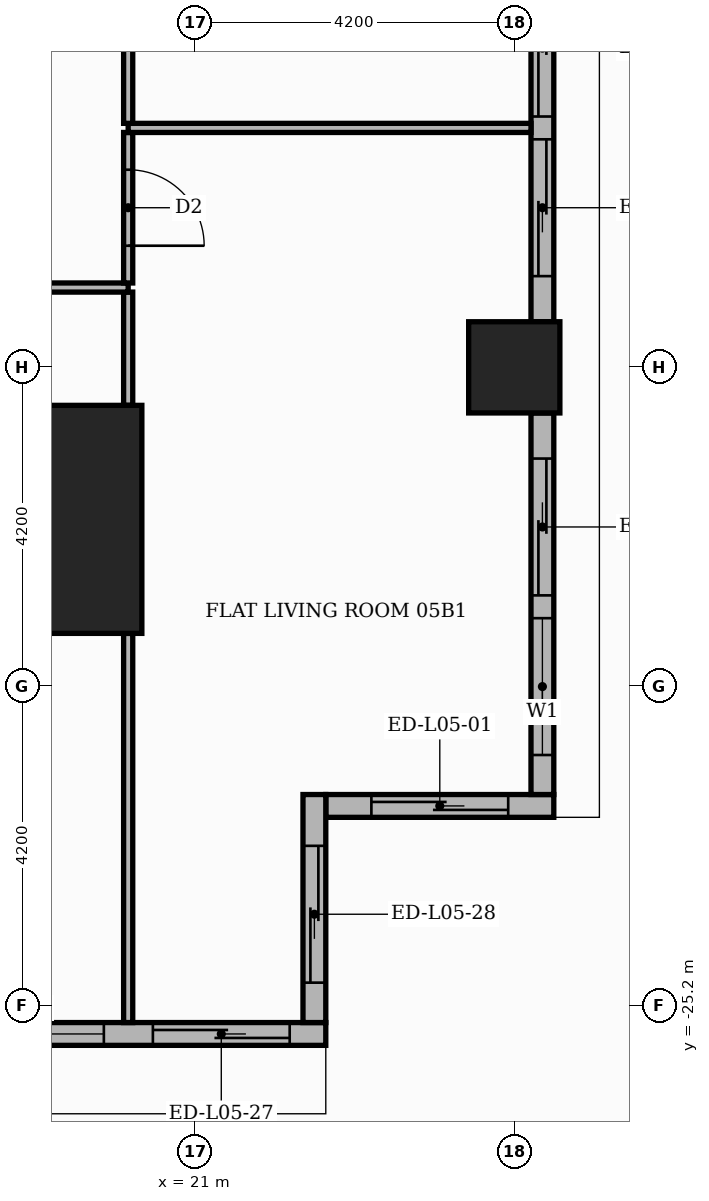
"""IFC4 building model, lengths in metres.
Left out: names, types, materials, properties, quantities, classifications, styles, units other than length and angle.
Written with IfcOpenShell. Run it as: python <this file> out.ifc"""

import sys

from ifc_helpers import new_model, si_unit, direction, frame, frame_2d, origin, origin_2d, place, context, subcontext, project, spatial, rectangle, extrude, element, fill, save


model = new_model("IFC4")
c1 = context("Model", 3, precision=1e-05, world=origin(), true_north=direction((0.0, 1.0)))
c2 = subcontext(c1, "Body", "Model", "MODEL_VIEW")
j1 = project(units=[si_unit("LENGTHUNIT", "METRE"), si_unit("PLANEANGLEUNIT", "RADIAN")], contexts=[c1])
p1 = place(None, origin())
s1 = spatial("IfcSite", under=j1, at=p1, CompositionType="ELEMENT")
p2 = place(p1, origin())
s2 = spatial("IfcBuilding", under=s1, at=p2, CompositionType="ELEMENT")
p3 = place(p2, frame((0.0, 0.0, 27.0)))
s3 = spatial("IfcBuildingStorey", under=s2, at=p3, CompositionType="ELEMENT", Elevation=27.0)
p4 = place(p3, frame((18.8, -18.8, 0.0), z_axis=(0.0, 0.0, 1.0), x_axis=(1.0, 0.0, 0.0)))
e1 = element("IfcColumn", 1, at=p4, inside=s3, PredefinedType="COLUMN", context=c2, shape_type="SweptSolid", body=[
    extrude(rectangle(XDim=3.0, YDim=3.0, at=origin_2d()), origin(), (0.0, 0.0, 1.0), 3.9),
])
p5 = place(p3, frame((25.2, -16.8, 0.0), z_axis=(0.0, 0.0, 1.0), x_axis=(1.0, 0.0, 0.0)))
e2 = element("IfcColumn", 2, at=p5, inside=s3, PredefinedType="COLUMN", context=c2, shape_type="SweptSolid", body=[
    extrude(rectangle(XDim=1.2, YDim=1.2, at=origin_2d()), origin(), (0.0, 0.0, 1.0), 3.9),
])
p6 = place(p3, frame((22.72, -22.57, 0.0), z_axis=(0.0, 0.0, 1.0), x_axis=(1.0, 0.0, 0.0)))
e3 = element("IfcWall", 3, at=p6, inside=s3, PredefinedType="STANDARD", context=c2, shape_type="SweptSolid", body=[
    extrude(rectangle(XDim=3.0, YDim=0.3, at=frame_2d((1.5, 0.0))), origin(), (0.0, 0.0, 1.0), 3.48),
])
p7 = place(p6, frame((0.6, 0.0, 0.0)))
e4 = element("IfcOpeningElement", 4, at=p7, cuts=e3, PredefinedType="OPENING", context=c2, shape_type="SweptSolid", body=[
    extrude(rectangle(XDim=1.8, YDim=2.4, at=frame_2d((0.9, 1.2))), frame((0.0, 0.16, 0.0), z_axis=(0.0, -1.0, 0.0), x_axis=(1.0, 0.0, 0.0)), (0.0, 0.0, 1.0), 0.32),
])
p8 = place(p3, frame((25.57, -22.42, 0.0), z_axis=(0.0, 0.0, 1.0), x_axis=(0.0, 1.0, 0.0)))
e5 = element("IfcWall", 5, at=p8, inside=s3, PredefinedType="STANDARD", context=c2, shape_type="SweptSolid", body=[
    extrude(rectangle(XDim=5.02, YDim=0.3, at=frame_2d((2.51, 0.0))), origin(), (0.0, 0.0, 1.0), 3.48),
])
p9 = place(p8, frame((0.52, 0.0, 0.9)))
e6 = element("IfcOpeningElement", 6, at=p9, cuts=e5, PredefinedType="OPENING", context=c2, shape_type="SweptSolid", body=[
    extrude(rectangle(XDim=1.8, YDim=2.1, at=frame_2d((0.9, 1.05))), frame((0.0, 0.16, 0.0), z_axis=(0.0, -1.0, 0.0), x_axis=(1.0, 0.0, 0.0)), (0.0, 0.0, 1.0), 0.32),
])
p10 = place(p8, frame((2.62, 0.0, 0.0)))
e7 = element("IfcOpeningElement", 7, at=p10, cuts=e5, PredefinedType="OPENING", context=c2, shape_type="SweptSolid", body=[
    extrude(rectangle(XDim=1.8, YDim=2.4, at=frame_2d((0.9, 1.2))), frame((0.0, 0.16, 0.0), z_axis=(0.0, -1.0, 0.0), x_axis=(1.0, 0.0, 0.0)), (0.0, 0.0, 1.0), 0.32),
])
p11 = place(p3, frame((25.57, -16.2, 0.0), z_axis=(0.0, 0.0, 1.0), x_axis=(0.0, 1.0, 0.0)))
e8 = element("IfcWall", 8, at=p11, inside=s3, PredefinedType="STANDARD", context=c2, shape_type="SweptSolid", body=[
    extrude(rectangle(XDim=7.2, YDim=0.3, at=frame_2d((3.6, 0.0))), origin(), (0.0, 0.0, 1.0), 3.48),
])
p12 = place(p11, frame((0.6, 0.0, 0.0)))
e9 = element("IfcOpeningElement", 9, at=p12, cuts=e8, PredefinedType="OPENING", context=c2, shape_type="SweptSolid", body=[
    extrude(rectangle(XDim=1.8, YDim=2.4, at=frame_2d((0.9, 1.2))), frame((0.0, 0.16, 0.0), z_axis=(0.0, -1.0, 0.0), x_axis=(1.0, 0.0, 0.0)), (0.0, 0.0, 1.0), 0.32),
])
p13 = place(p11, frame((2.7, 0.0, 0.0)))
e10 = element("IfcOpeningElement", 10, at=p13, cuts=e8, PredefinedType="OPENING", context=c2, shape_type="SweptSolid", body=[
    extrude(rectangle(XDim=1.8, YDim=2.4, at=frame_2d((0.9, 1.2))), frame((0.0, 0.16, 0.0), z_axis=(0.0, -1.0, 0.0), x_axis=(1.0, 0.0, 0.0)), (0.0, 0.0, 1.0), 0.32),
])
p14 = place(p11, frame((4.8, 0.0, 0.9)))
e11 = element("IfcOpeningElement", 11, at=p14, cuts=e8, PredefinedType="OPENING", context=c2, shape_type="SweptSolid", body=[
    extrude(rectangle(XDim=1.8, YDim=2.1, at=frame_2d((0.9, 1.05))), frame((0.0, 0.16, 0.0), z_axis=(0.0, -1.0, 0.0), x_axis=(1.0, 0.0, 0.0)), (0.0, 0.0, 1.0), 0.32),
])
p15 = place(p3, frame((17.4, -25.57, 0.0), z_axis=(0.0, 0.0, 1.0), x_axis=(1.0, 0.0, 0.0)))
e12 = element("IfcWall", 12, at=p15, inside=s3, PredefinedType="STANDARD", context=c2, shape_type="SweptSolid", body=[
    extrude(rectangle(XDim=5.32, YDim=0.3, at=frame_2d((2.66, 0.0))), origin(), (0.0, 0.0, 1.0), 3.48),
])
p16 = place(p15, frame((0.6, 0.0, 0.9)))
e13 = element("IfcOpeningElement", 13, at=p16, cuts=e12, PredefinedType="OPENING", context=c2, shape_type="SweptSolid", body=[
    extrude(rectangle(XDim=1.8, YDim=2.1, at=frame_2d((0.9, 1.05))), frame((0.0, 0.16, 0.0), z_axis=(0.0, -1.0, 0.0), x_axis=(1.0, 0.0, 0.0)), (0.0, 0.0, 1.0), 0.32),
])
p17 = place(p15, frame((3.045, 0.0, 0.0)))
e14 = element("IfcOpeningElement", 14, at=p17, cuts=e12, PredefinedType="OPENING", context=c2, shape_type="SweptSolid", body=[
    extrude(rectangle(XDim=1.8, YDim=2.4, at=frame_2d((0.9, 1.2))), frame((0.0, 0.16, 0.0), z_axis=(0.0, -1.0, 0.0), x_axis=(1.0, 0.0, 0.0)), (0.0, 0.0, 1.0), 0.32),
])
p18 = place(p3, frame((22.57, -25.42, 0.0), z_axis=(0.0, 0.0, 1.0), x_axis=(0.0, 1.0, 0.0)))
e15 = element("IfcWall", 15, at=p18, inside=s3, PredefinedType="STANDARD", context=c2, shape_type="SweptSolid", body=[
    extrude(rectangle(XDim=3.0, YDim=0.3, at=frame_2d((1.5, 0.0))), origin(), (0.0, 0.0, 1.0), 3.48),
])
p19 = place(p18, frame((0.525, 0.0, 0.0)))
e16 = element("IfcOpeningElement", 16, at=p19, cuts=e15, PredefinedType="OPENING", context=c2, shape_type="SweptSolid", body=[
    extrude(rectangle(XDim=1.8, YDim=2.4, at=frame_2d((0.9, 1.2))), frame((0.0, 0.16, 0.0), z_axis=(0.0, -1.0, 0.0), x_axis=(1.0, 0.0, 0.0)), (0.0, 0.0, 1.0), 0.32),
])
p20 = place(p3, frame((20.12, -25.42, 0.0), z_axis=(0.0, 0.0, 1.0), x_axis=(0.0, 1.0, 0.0)))
e17 = element("IfcWall", 17, at=p20, inside=s3, PredefinedType="PARTITIONING", context=c2, shape_type="SweptSolid", body=[
    extrude(rectangle(XDim=5.12, YDim=0.12, at=frame_2d((2.56, 0.0))), origin(), (0.0, 0.0, 1.0), 3.48),
])
p21 = place(p3, frame((20.12, -17.3, 0.0), z_axis=(0.0, 0.0, 1.0), x_axis=(0.0, 1.0, 0.0)))
e18 = element("IfcWall", 18, at=p21, inside=s3, PredefinedType="PARTITIONING", context=c2, shape_type="SweptSolid", body=[
    extrude(rectangle(XDim=1.49, YDim=0.12, at=frame_2d((0.745, 0.0))), origin(), (0.0, 0.0, 1.0), 3.48),
])
p22 = place(p3, frame((13.75, -15.75, 0.0), z_axis=(0.0, 0.0, 1.0), x_axis=(1.0, 0.0, 0.0)))
e19 = element("IfcWall", 19, at=p22, inside=s3, PredefinedType="PARTITIONING", context=c2, shape_type="SweptSolid", body=[
    extrude(rectangle(XDim=6.37, YDim=0.12, at=frame_2d((3.185, 0.0))), origin(), (0.0, 0.0, 1.0), 3.48),
])
p23 = place(p22, frame((2.635, 0.0, 0.0)))
e20 = element("IfcOpeningElement", 20, at=p23, cuts=e19, PredefinedType="OPENING", context=c2, shape_type="SweptSolid", body=[
    extrude(rectangle(XDim=1.0, YDim=2.1, at=frame_2d((0.5, 1.05))), frame((0.0, 0.07, 0.0), z_axis=(0.0, -1.0, 0.0), x_axis=(1.0, 0.0, 0.0)), (0.0, 0.0, 1.0), 0.14),
])
p24 = place(p3, frame((20.12, -15.69, 0.0), z_axis=(0.0, 0.0, 1.0), x_axis=(0.0, 1.0, 0.0)))
e21 = element("IfcWall", 21, at=p24, inside=s3, PredefinedType="PARTITIONING", context=c2, shape_type="SweptSolid", body=[
    extrude(rectangle(XDim=1.98, YDim=0.12, at=frame_2d((0.99, 0.0))), origin(), (0.0, 0.0, 1.0), 3.48),
])
p25 = place(p24, frame((0.49, 0.0, 0.0)))
e22 = element("IfcOpeningElement", 22, at=p25, cuts=e21, PredefinedType="OPENING", context=c2, shape_type="SweptSolid", body=[
    extrude(rectangle(XDim=1.0, YDim=2.1, at=frame_2d((0.5, 1.05))), frame((0.0, 0.07, 0.0), z_axis=(0.0, -1.0, 0.0), x_axis=(1.0, 0.0, 0.0)), (0.0, 0.0, 1.0), 0.14),
])
p26 = place(p3, frame((20.12, -13.65, 0.0), z_axis=(0.0, 0.0, 1.0), x_axis=(1.0, 0.0, 0.0)))
e23 = element("IfcWall", 23, at=p26, inside=s3, PredefinedType="PARTITIONING", context=c2, shape_type="SweptSolid", body=[
    extrude(rectangle(XDim=5.3, YDim=0.12, at=frame_2d((2.65, 0.0))), origin(), (0.0, 0.0, 1.0), 3.48),
])
p27 = place(p3, frame((20.12, -13.59, 0.0), z_axis=(0.0, 0.0, 1.0), x_axis=(0.0, 1.0, 0.0)))
e24 = element("IfcWall", 24, at=p27, inside=s3, PredefinedType="PARTITIONING", context=c2, shape_type="SweptSolid", body=[
    extrude(rectangle(XDim=4.08, YDim=0.12, at=frame_2d((2.04, 0.0))), origin(), (0.0, 0.0, 1.0), 3.48),
])
p28 = place(p27, frame((1.59, 0.0, 0.0)))
e25 = element("IfcOpeningElement", 25, at=p28, cuts=e24, PredefinedType="OPENING", context=c2, shape_type="SweptSolid", body=[
    extrude(rectangle(XDim=0.9, YDim=2.1, at=frame_2d((0.45, 1.05))), frame((0.0, 0.07, 0.0), z_axis=(0.0, -1.0, 0.0), x_axis=(1.0, 0.0, 0.0)), (0.0, 0.0, 1.0), 0.14),
])
p29 = place(p7, origin())
e26 = element("IfcDoor", 26, at=p29, inside=s3, OperationType="SLIDING_TO_RIGHT", PredefinedType="DOOR", context=c2, shape_type="SweptSolid", body=[
    extrude(rectangle(XDim=1.8, YDim=2.4, at=frame_2d((0.9, 1.2))), frame((0.0, 0.025, 0.0), z_axis=(0.0, -1.0, 0.0), x_axis=(1.0, 0.0, 0.0)), (0.0, 0.0, 1.0), 0.05),
])
fill(e4, e26)
p30 = place(p9, origin())
e27 = element("IfcWindow", 27, at=p30, inside=s3, PartitioningType="SINGLE_PANEL", PredefinedType="WINDOW", context=c2, shape_type="SweptSolid", body=[
    extrude(rectangle(XDim=1.8, YDim=2.1, at=frame_2d((0.9, 1.05))), frame((0.0, 0.03, 0.0), z_axis=(0.0, -1.0, 0.0), x_axis=(1.0, 0.0, 0.0)), (0.0, 0.0, 1.0), 0.06),
])
fill(e6, e27)
p31 = place(p10, origin())
e28 = element("IfcDoor", 28, at=p31, inside=s3, OperationType="SLIDING_TO_RIGHT", PredefinedType="DOOR", context=c2, shape_type="SweptSolid", body=[
    extrude(rectangle(XDim=1.8, YDim=2.4, at=frame_2d((0.9, 1.2))), frame((0.0, 0.025, 0.0), z_axis=(0.0, -1.0, 0.0), x_axis=(1.0, 0.0, 0.0)), (0.0, 0.0, 1.0), 0.05),
])
fill(e7, e28)
p32 = place(p12, origin())
e29 = element("IfcDoor", 29, at=p32, inside=s3, OperationType="SLIDING_TO_LEFT", PredefinedType="DOOR", context=c2, shape_type="SweptSolid", body=[
    extrude(rectangle(XDim=1.8, YDim=2.4, at=frame_2d((0.9, 1.2))), frame((0.0, 0.025, 0.0), z_axis=(0.0, -1.0, 0.0), x_axis=(1.0, 0.0, 0.0)), (0.0, 0.0, 1.0), 0.05),
])
fill(e9, e29)
p33 = place(p13, origin())
e30 = element("IfcDoor", 30, at=p33, inside=s3, OperationType="SLIDING_TO_RIGHT", PredefinedType="DOOR", context=c2, shape_type="SweptSolid", body=[
    extrude(rectangle(XDim=1.8, YDim=2.4, at=frame_2d((0.9, 1.2))), frame((0.0, 0.025, 0.0), z_axis=(0.0, -1.0, 0.0), x_axis=(1.0, 0.0, 0.0)), (0.0, 0.0, 1.0), 0.05),
])
fill(e10, e30)
p34 = place(p16, origin())
e31 = element("IfcWindow", 31, at=p34, inside=s3, PartitioningType="SINGLE_PANEL", PredefinedType="WINDOW", context=c2, shape_type="SweptSolid", body=[
    extrude(rectangle(XDim=1.8, YDim=2.1, at=frame_2d((0.9, 1.05))), frame((0.0, 0.03, 0.0), z_axis=(0.0, -1.0, 0.0), x_axis=(1.0, 0.0, 0.0)), (0.0, 0.0, 1.0), 0.06),
])
fill(e13, e31)
p35 = place(p17, origin())
e32 = element("IfcDoor", 32, at=p35, inside=s3, OperationType="SLIDING_TO_RIGHT", PredefinedType="DOOR", context=c2, shape_type="SweptSolid", body=[
    extrude(rectangle(XDim=1.8, YDim=2.4, at=frame_2d((0.9, 1.2))), frame((0.0, 0.025, 0.0), z_axis=(0.0, -1.0, 0.0), x_axis=(1.0, 0.0, 0.0)), (0.0, 0.0, 1.0), 0.05),
])
fill(e14, e32)
p36 = place(p19, origin())
e33 = element("IfcDoor", 33, at=p36, inside=s3, OperationType="SLIDING_TO_LEFT", PredefinedType="DOOR", context=c2, shape_type="SweptSolid", body=[
    extrude(rectangle(XDim=1.8, YDim=2.4, at=frame_2d((0.9, 1.2))), frame((0.0, 0.025, 0.0), z_axis=(0.0, -1.0, 0.0), x_axis=(1.0, 0.0, 0.0)), (0.0, 0.0, 1.0), 0.05),
])
fill(e16, e33)
p37 = place(p25, frame((1.0, 0.0, 0.0), z_axis=(0.0, 0.0, 1.0), x_axis=(-1.0, 0.0, 0.0)))
e34 = element("IfcDoor", 34, at=p37, inside=s3, OperationType="SINGLE_SWING_LEFT", PredefinedType="DOOR", context=c2, shape_type="SweptSolid", body=[
    extrude(rectangle(XDim=1.0, YDim=2.1, at=frame_2d((0.5, 1.05))), frame((0.0, 0.025, 0.0), z_axis=(0.0, -1.0, 0.0), x_axis=(1.0, 0.0, 0.0)), (0.0, 0.0, 1.0), 0.05),
])
fill(e22, e34)
save(model, sys.argv[1])
